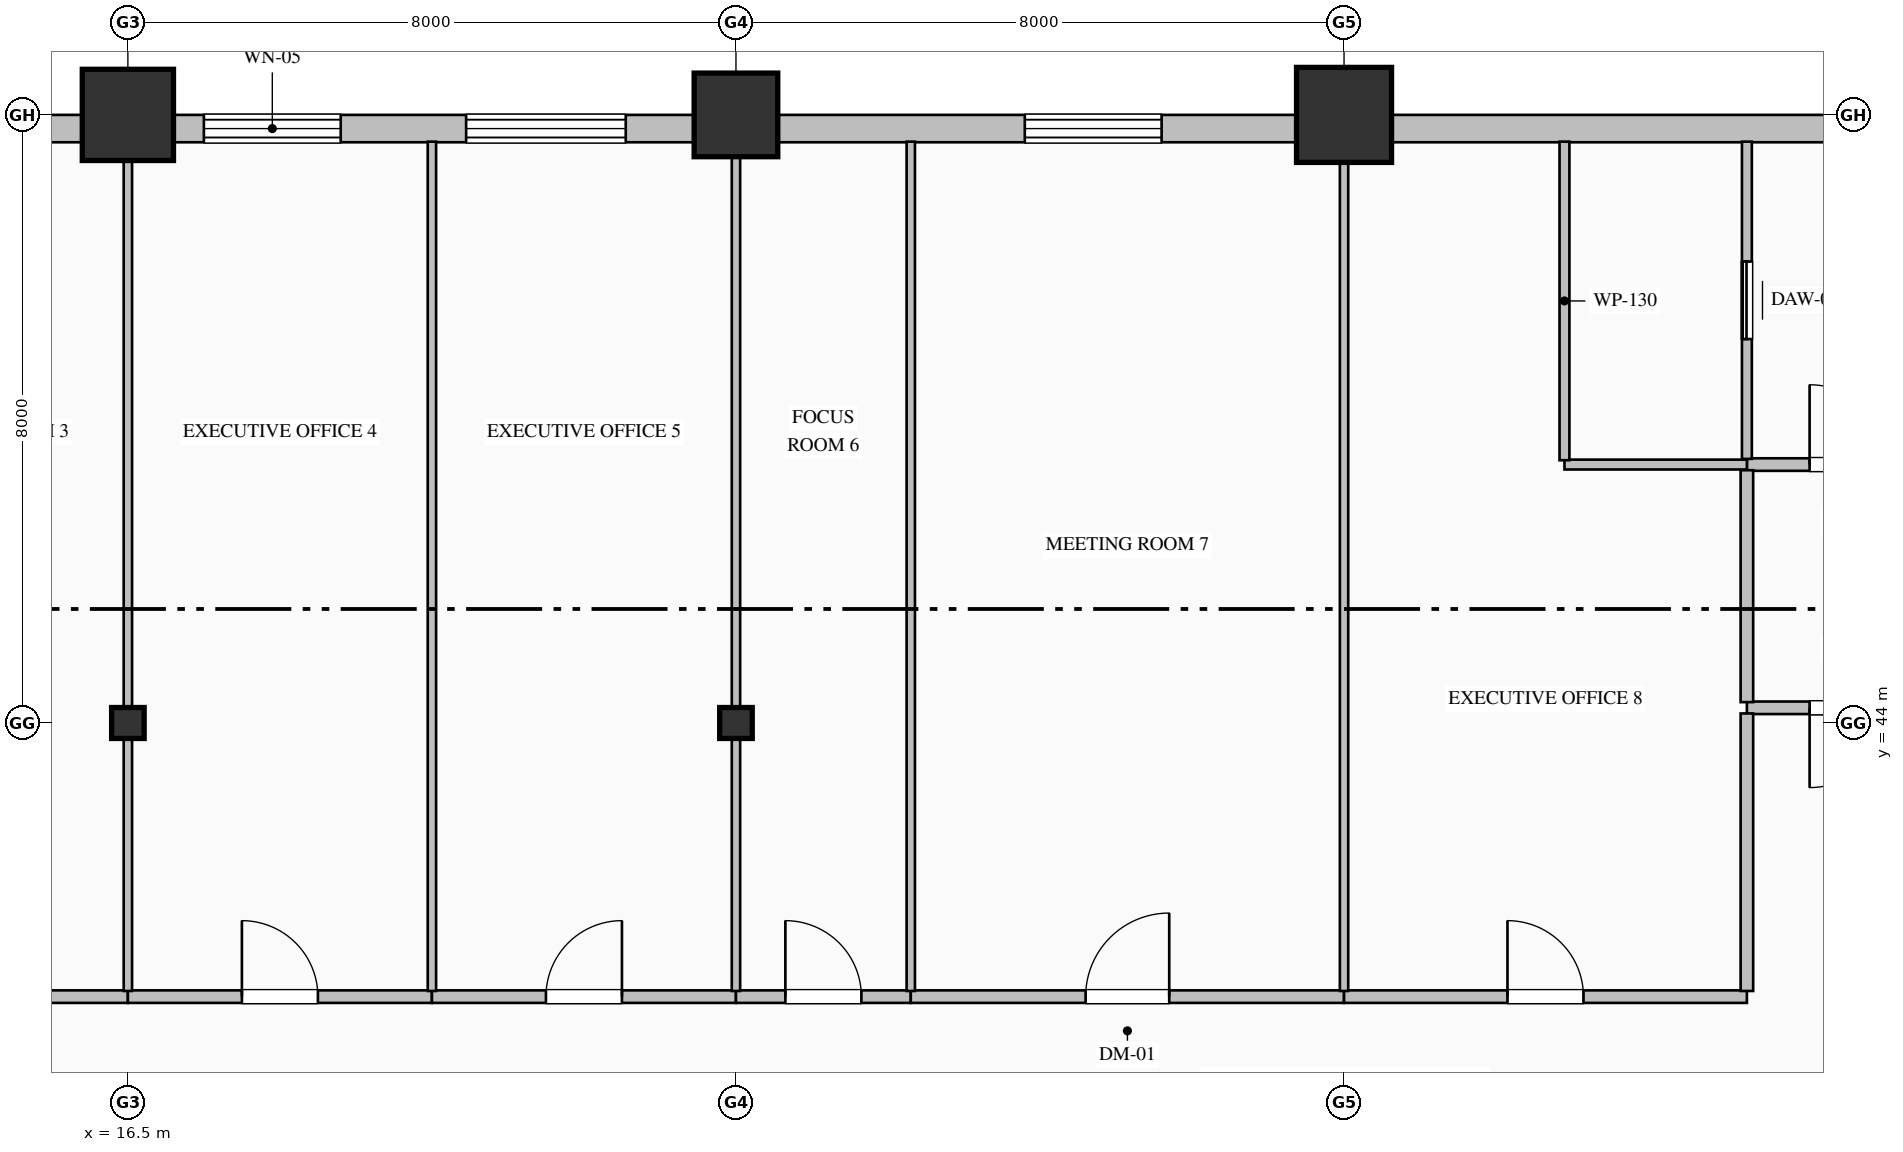
"""IFC4 building model, lengths in metres.
Left out: names, types, materials, properties, quantities, classifications, styles, units other than length and angle.
Written with IfcOpenShell. Run it as: python <this file> out.ifc"""

import sys

from ifc_helpers import new_model, si_unit, direction, frame, frame_2d, origin, origin_2d, place, context, subcontext, project, spatial, rectangle, hollow_rectangle, hollow_circle, i_section, extrude, element, fill, save


model = new_model("IFC4")
c1 = context("Model", 3, precision=1e-05, world=origin(), true_north=direction((0.0, 1.0)))
c2 = subcontext(c1, "Body", "Model", "MODEL_VIEW")
j1 = project(units=[si_unit("LENGTHUNIT", "METRE"), si_unit("PLANEANGLEUNIT", "RADIAN")], contexts=[c1])
p1 = place(None, origin())
s1 = spatial("IfcSite", under=j1, at=p1, CompositionType="ELEMENT")
p2 = place(p1, origin())
s2 = spatial("IfcBuilding", under=s1, at=p2, CompositionType="ELEMENT")
p3 = place(p2, frame((0.0, 0.0, 32.2)))
s3 = spatial("IfcBuildingStorey", under=s2, at=p3, CompositionType="ELEMENT", Elevation=32.2)
p4 = place(p3, frame((16.5, 44.0, 0.0), z_axis=(0.0, 0.0, 1.0), x_axis=(1.0, 0.0, 0.0)))
e1 = element("IfcColumn", 1, at=p4, inside=s3, PredefinedType="COLUMN", context=c2, shape_type="SweptSolid", body=[
    extrude(i_section(OverallWidth=0.407, OverallDepth=0.428, WebThickness=0.02, FlangeThickness=0.035, FilletRadius=0.022, at=origin_2d()), origin(), (0.0, 0.0, 1.0), 4.0),
])
p5 = place(p3, frame((16.5, 52.0, 0.0), z_axis=(0.0, 0.0, 1.0), x_axis=(1.0, 0.0, 0.0)))
e2 = element("IfcColumn", 2, at=p5, inside=s3, PredefinedType="COLUMN", context=c2, shape_type="SweptSolid", body=[
    extrude(hollow_circle(Radius=0.6, WallThickness=0.04, at=origin_2d()), origin(), (0.0, 0.0, 1.0), 4.0),
])
p6 = place(p3, frame((24.5, 44.0, 0.0), z_axis=(0.0, 0.0, 1.0), x_axis=(1.0, 0.0, 0.0)))
e3 = element("IfcColumn", 3, at=p6, inside=s3, PredefinedType="COLUMN", context=c2, shape_type="SweptSolid", body=[
    extrude(i_section(OverallWidth=0.407, OverallDepth=0.428, WebThickness=0.02, FlangeThickness=0.035, FilletRadius=0.022, at=origin_2d()), origin(), (0.0, 0.0, 1.0), 4.0),
])
p7 = place(p3, frame((24.5, 52.0, 0.0), z_axis=(0.0, 0.0, 1.0), x_axis=(1.0, 0.0, 0.0)))
e4 = element("IfcColumn", 4, at=p7, inside=s3, PredefinedType="COLUMN", context=c2, shape_type="SweptSolid", body=[
    extrude(hollow_rectangle(XDim=1.1, YDim=1.1, WallThickness=0.04, at=origin_2d()), origin(), (0.0, 0.0, 1.0), 4.0),
])
p8 = place(p3, frame((32.5, 52.0, 0.0), z_axis=(0.0, 0.0, 1.0), x_axis=(1.0, 0.0, 0.0)))
e5 = element("IfcColumn", 5, at=p8, inside=s3, PredefinedType="COLUMN", context=c2, shape_type="SweptSolid", body=[
    extrude(hollow_rectangle(XDim=1.25, YDim=1.25, WallThickness=0.045, at=origin_2d()), origin(), (0.0, 0.0, 1.0), 4.0),
])
p9 = place(p3, frame((4.0, 51.82, 0.0), z_axis=(0.0, 0.0, 1.0), x_axis=(1.0, 0.0, 0.0)))
e6 = element("IfcWall", 6, at=p9, inside=s3, PredefinedType="SOLIDWALL", context=c2, shape_type="SweptSolid", body=[
    extrude(rectangle(XDim=36.52, YDim=0.36, at=frame_2d((18.26, 0.0))), origin(), (0.0, 0.0, 1.0), 3.25),
])
p10 = place(p9, frame((6.15, 0.0, 0.85)))
e7 = element("IfcOpeningElement", 7, at=p10, cuts=e6, PredefinedType="OPENING", context=c2, shape_type="SweptSolid", body=[
    extrude(rectangle(XDim=2.1, YDim=2.05, at=frame_2d((1.05, 1.025))), frame((0.0, 0.19, 0.0), z_axis=(0.0, -1.0, 0.0), x_axis=(1.0, 0.0, 0.0)), (0.0, 0.0, 1.0), 0.38),
])
p11 = place(p9, frame((13.5, 0.0, 0.85)))
e8 = element("IfcOpeningElement", 8, at=p11, cuts=e6, PredefinedType="OPENING", context=c2, shape_type="SweptSolid", body=[
    extrude(rectangle(XDim=1.8, YDim=2.05, at=frame_2d((0.9, 1.025))), frame((0.0, 0.19, 0.0), z_axis=(0.0, -1.0, 0.0), x_axis=(1.0, 0.0, 0.0)), (0.0, 0.0, 1.0), 0.38),
])
p12 = place(p9, frame((16.95, 0.0, 0.85)))
e9 = element("IfcOpeningElement", 9, at=p12, cuts=e6, PredefinedType="OPENING", context=c2, shape_type="SweptSolid", body=[
    extrude(rectangle(XDim=2.1, YDim=2.05, at=frame_2d((1.05, 1.025))), frame((0.0, 0.19, 0.0), z_axis=(0.0, -1.0, 0.0), x_axis=(1.0, 0.0, 0.0)), (0.0, 0.0, 1.0), 0.38),
])
p13 = place(p9, frame((24.3, 0.0, 0.85)))
e10 = element("IfcOpeningElement", 10, at=p13, cuts=e6, PredefinedType="OPENING", context=c2, shape_type="SweptSolid", body=[
    extrude(rectangle(XDim=1.8, YDim=2.05, at=frame_2d((0.9, 1.025))), frame((0.0, 0.19, 0.0), z_axis=(0.0, -1.0, 0.0), x_axis=(1.0, 0.0, 0.0)), (0.0, 0.0, 1.0), 0.38),
])
p14 = place(p3, frame((37.8, 47.4, 0.0), z_axis=(0.0, 0.0, 1.0), x_axis=(1.0, 0.0, 0.0)))
e11 = element("IfcWall", 11, at=p14, inside=s3, PredefinedType="PARTITIONING", context=c2, shape_type="SweptSolid", body=[
    extrude(rectangle(XDim=2.7, YDim=0.165, at=frame_2d((1.35, 0.0))), origin(), (0.0, 0.0, 1.0), 3.75),
])
p15 = place(p14, frame((0.825, 0.0, 0.0)))
e12 = element("IfcOpeningElement", 12, at=p15, cuts=e11, PredefinedType="OPENING", context=c2, shape_type="SweptSolid", body=[
    extrude(rectangle(XDim=1.05, YDim=2.15, at=frame_2d((0.525, 1.075))), frame((0.0, 0.093, 0.0), z_axis=(0.0, -1.0, 0.0), x_axis=(1.0, 0.0, 0.0)), (0.0, 0.0, 1.0), 0.185),
])
p16 = place(p3, frame((40.5, 44.2, 0.0), z_axis=(0.0, 0.0, 1.0), x_axis=(-1.0, 0.0, 0.0)))
e13 = element("IfcWall", 13, at=p16, inside=s3, PredefinedType="PARTITIONING", context=c2, shape_type="SweptSolid", body=[
    extrude(rectangle(XDim=2.7, YDim=0.165, at=frame_2d((1.35, 0.0))), origin(), (0.0, 0.0, 1.0), 3.75),
])
p17 = place(p16, frame((0.825, 0.0, 0.0)))
e14 = element("IfcOpeningElement", 14, at=p17, cuts=e13, PredefinedType="OPENING", context=c2, shape_type="SweptSolid", body=[
    extrude(rectangle(XDim=1.05, YDim=2.15, at=frame_2d((0.525, 1.075))), frame((0.0, 0.093, 0.0), z_axis=(0.0, -1.0, 0.0), x_axis=(1.0, 0.0, 0.0)), (0.0, 0.0, 1.0), 0.185),
])
p18 = place(p3, frame((37.8, 44.274, 0.0), z_axis=(0.0, 0.0, 1.0), x_axis=(0.0, 1.0, 0.0)))
e15 = element("IfcWall", 15, at=p18, inside=s3, PredefinedType="PARTITIONING", context=c2, shape_type="SweptSolid", body=[
    extrude(rectangle(XDim=3.051, YDim=0.165, at=frame_2d((1.525, 0.0))), origin(), (0.0, 0.0, 1.0), 3.75),
])
p19 = place(p3, frame((37.8, 47.475, 0.0), z_axis=(0.0, 0.0, 1.0), x_axis=(0.0, 1.0, 0.0)))
e16 = element("IfcWall", 16, at=p19, inside=s3, PredefinedType="PARTITIONING", context=c2, shape_type="SweptSolid", body=[
    extrude(rectangle(XDim=4.173, YDim=0.13, at=frame_2d((2.087, 0.0))), origin(), (0.0, 0.0, 1.0), 3.75),
])
p20 = place(p19, frame((1.577, 0.0, 0.0)))
e17 = element("IfcOpeningElement", 17, at=p20, cuts=e16, PredefinedType="OPENING", context=c2, shape_type="SweptSolid", body=[
    extrude(rectangle(XDim=1.02, YDim=2.15, at=frame_2d((0.51, 1.075))), frame((0.0, 0.075, 0.0), z_axis=(0.0, -1.0, 0.0), x_axis=(1.0, 0.0, 0.0)), (0.0, 0.0, 1.0), 0.15),
])
p21 = place(p3, frame((37.8, 47.4, 0.0), z_axis=(0.0, 0.0, 1.0), x_axis=(-1.0, 0.0, 0.0)))
e18 = element("IfcWall", 18, at=p21, inside=s3, PredefinedType="PARTITIONING", context=c2, shape_type="SweptSolid", body=[
    extrude(rectangle(XDim=2.4, YDim=0.13, at=frame_2d((1.2, 0.0))), origin(), (0.0, 0.0, 1.0), 3.75),
])
p22 = place(p3, frame((35.4, 47.457, 0.0), z_axis=(0.0, 0.0, 1.0), x_axis=(0.0, 1.0, 0.0)))
e19 = element("IfcWall", 19, at=p22, inside=s3, PredefinedType="PARTITIONING", context=c2, shape_type="SweptSolid", body=[
    extrude(rectangle(XDim=4.191, YDim=0.13, at=frame_2d((2.095, 0.0))), origin(), (0.0, 0.0, 1.0), 3.75),
])
p23 = place(p3, frame((12.8, 40.4, 0.0), z_axis=(0.0, 0.0, 1.0), x_axis=(1.0, 0.0, 0.0)))
e20 = element("IfcWall", 20, at=p23, inside=s3, PredefinedType="PARTITIONING", context=c2, shape_type="SweptSolid", body=[
    extrude(rectangle(XDim=3.7, YDim=0.165, at=frame_2d((1.85, 0.0))), origin(), (0.0, 0.0, 1.0), 3.75),
])
p24 = place(p23, frame((1.3, 0.0, 0.0)))
e21 = element("IfcOpeningElement", 21, at=p24, cuts=e20, PredefinedType="OPENING", context=c2, shape_type="SweptSolid", body=[
    extrude(rectangle(XDim=1.1, YDim=2.2, at=frame_2d((0.55, 1.1))), frame((0.0, 0.093, 0.0), z_axis=(0.0, -1.0, 0.0), x_axis=(1.0, 0.0, 0.0)), (0.0, 0.0, 1.0), 0.185),
])
p25 = place(p3, frame((16.5, 40.4, 0.0), z_axis=(0.0, 0.0, 1.0), x_axis=(1.0, 0.0, 0.0)))
e22 = element("IfcWall", 22, at=p25, inside=s3, PredefinedType="PARTITIONING", context=c2, shape_type="SweptSolid", body=[
    extrude(rectangle(XDim=4.0, YDim=0.165, at=frame_2d((2.0, 0.0))), origin(), (0.0, 0.0, 1.0), 3.75),
])
p26 = place(p25, frame((1.5, 0.0, 0.0)))
e23 = element("IfcOpeningElement", 23, at=p26, cuts=e22, PredefinedType="OPENING", context=c2, shape_type="SweptSolid", body=[
    extrude(rectangle(XDim=1.0, YDim=2.15, at=frame_2d((0.5, 1.075))), frame((0.0, 0.093, 0.0), z_axis=(0.0, -1.0, 0.0), x_axis=(1.0, 0.0, 0.0)), (0.0, 0.0, 1.0), 0.185),
])
p27 = place(p3, frame((20.5, 40.4, 0.0), z_axis=(0.0, 0.0, 1.0), x_axis=(1.0, 0.0, 0.0)))
e24 = element("IfcWall", 24, at=p27, inside=s3, PredefinedType="PARTITIONING", context=c2, shape_type="SweptSolid", body=[
    extrude(rectangle(XDim=4.0, YDim=0.165, at=frame_2d((2.0, 0.0))), origin(), (0.0, 0.0, 1.0), 3.75),
])
p28 = place(p27, frame((1.5, 0.0, 0.0)))
e25 = element("IfcOpeningElement", 25, at=p28, cuts=e24, PredefinedType="OPENING", context=c2, shape_type="SweptSolid", body=[
    extrude(rectangle(XDim=1.0, YDim=2.15, at=frame_2d((0.5, 1.075))), frame((0.0, 0.093, 0.0), z_axis=(0.0, -1.0, 0.0), x_axis=(1.0, 0.0, 0.0)), (0.0, 0.0, 1.0), 0.185),
])
p29 = place(p3, frame((24.5, 40.4, 0.0), z_axis=(0.0, 0.0, 1.0), x_axis=(1.0, 0.0, 0.0)))
e26 = element("IfcWall", 26, at=p29, inside=s3, PredefinedType="PARTITIONING", context=c2, shape_type="SweptSolid", body=[
    extrude(rectangle(XDim=2.3, YDim=0.165, at=frame_2d((1.15, 0.0))), origin(), (0.0, 0.0, 1.0), 3.75),
])
p30 = place(p29, frame((0.65, 0.0, 0.0)))
e27 = element("IfcOpeningElement", 27, at=p30, cuts=e26, PredefinedType="OPENING", context=c2, shape_type="SweptSolid", body=[
    extrude(rectangle(XDim=1.0, YDim=2.15, at=frame_2d((0.5, 1.075))), frame((0.0, 0.093, 0.0), z_axis=(0.0, -1.0, 0.0), x_axis=(1.0, 0.0, 0.0)), (0.0, 0.0, 1.0), 0.185),
])
p31 = place(p3, frame((26.8, 40.4, 0.0), z_axis=(0.0, 0.0, 1.0), x_axis=(1.0, 0.0, 0.0)))
e28 = element("IfcWall", 28, at=p31, inside=s3, PredefinedType="PARTITIONING", context=c2, shape_type="SweptSolid", body=[
    extrude(rectangle(XDim=5.7, YDim=0.165, at=frame_2d((2.85, 0.0))), origin(), (0.0, 0.0, 1.0), 3.75),
])
p32 = place(p31, frame((2.3, 0.0, 0.0)))
e29 = element("IfcOpeningElement", 29, at=p32, cuts=e28, PredefinedType="OPENING", context=c2, shape_type="SweptSolid", body=[
    extrude(rectangle(XDim=1.1, YDim=2.2, at=frame_2d((0.55, 1.1))), frame((0.0, 0.093, 0.0), z_axis=(0.0, -1.0, 0.0), x_axis=(1.0, 0.0, 0.0)), (0.0, 0.0, 1.0), 0.185),
])
p33 = place(p3, frame((32.5, 40.4, 0.0), z_axis=(0.0, 0.0, 1.0), x_axis=(1.0, 0.0, 0.0)))
e30 = element("IfcWall", 30, at=p33, inside=s3, PredefinedType="PARTITIONING", context=c2, shape_type="SweptSolid", body=[
    extrude(rectangle(XDim=5.3, YDim=0.165, at=frame_2d((2.65, 0.0))), origin(), (0.0, 0.0, 1.0), 3.75),
])
p34 = place(p33, frame((2.15, 0.0, 0.0)))
e31 = element("IfcOpeningElement", 31, at=p34, cuts=e30, PredefinedType="OPENING", context=c2, shape_type="SweptSolid", body=[
    extrude(rectangle(XDim=1.0, YDim=2.15, at=frame_2d((0.5, 1.075))), frame((0.0, 0.093, 0.0), z_axis=(0.0, -1.0, 0.0), x_axis=(1.0, 0.0, 0.0)), (0.0, 0.0, 1.0), 0.185),
])
p35 = place(p3, frame((37.8, 40.475, 0.0), z_axis=(0.0, 0.0, 1.0), x_axis=(0.0, 1.0, 0.0)))
e32 = element("IfcWall", 32, at=p35, inside=s3, PredefinedType="PARTITIONING", context=c2, shape_type="SweptSolid", body=[
    extrude(rectangle(XDim=3.651, YDim=0.165, at=frame_2d((1.825, 0.0))), origin(), (0.0, 0.0, 1.0), 3.75),
])
p36 = place(p3, frame((16.5, 51.648, 0.0), z_axis=(0.0, 0.0, 1.0), x_axis=(0.0, -1.0, 0.0)))
e33 = element("IfcWall", 33, at=p36, inside=s3, PredefinedType="MOVABLE", context=c2, shape_type="SweptSolid", body=[
    extrude(rectangle(XDim=11.173, YDim=0.11, at=frame_2d((5.587, 0.0))), origin(), (0.0, 0.0, 1.0), 3.042),
])
p37 = place(p3, frame((20.5, 51.648, 0.0), z_axis=(0.0, 0.0, 1.0), x_axis=(0.0, -1.0, 0.0)))
e34 = element("IfcWall", 34, at=p37, inside=s3, PredefinedType="MOVABLE", context=c2, shape_type="SweptSolid", body=[
    extrude(rectangle(XDim=11.173, YDim=0.11, at=frame_2d((5.587, 0.0))), origin(), (0.0, 0.0, 1.0), 3.75),
])
p38 = place(p3, frame((24.5, 51.648, 0.0), z_axis=(0.0, 0.0, 1.0), x_axis=(0.0, -1.0, 0.0)))
e35 = element("IfcWall", 35, at=p38, inside=s3, PredefinedType="MOVABLE", context=c2, shape_type="SweptSolid", body=[
    extrude(rectangle(XDim=11.173, YDim=0.11, at=frame_2d((5.587, 0.0))), origin(), (0.0, 0.0, 1.0), 3.042),
])
for number, where, z_axis, x_axis in (
    (36, (26.8, 51.648, 0.0), (0.0, 0.0, 1.0), (0.0, -1.0, 0.0)),
    (37, (32.5, 51.648, 0.0), (0.0, 0.0, 1.0), (0.0, -1.0, 0.0)),
):
    element("IfcWall", number, at=place(p3, frame(where, z_axis=z_axis, x_axis=x_axis)), inside=s3, PredefinedType="MOVABLE", context=c2, shape_type="SweptSolid", body=[
        extrude(rectangle(XDim=11.173, YDim=0.11, at=frame_2d((5.587, 0.0))), origin(), (0.0, 0.0, 1.0), 3.75),
    ])
p39 = place(p11, origin())
e38 = element("IfcWindow", 38, at=p39, inside=s3, PartitioningType="TRIPLE_PANEL_VERTICAL", PredefinedType="WINDOW", context=c2, shape_type="SweptSolid", body=[
    extrude(rectangle(XDim=1.8, YDim=2.05, at=frame_2d((0.9, 1.025))), frame((0.0, 0.15, 0.0), z_axis=(0.0, -1.0, 0.0), x_axis=(1.0, 0.0, 0.0)), (0.0, 0.0, 1.0), 0.06),
])
fill(e8, e38)
p40 = place(p12, origin())
e39 = element("IfcWindow", 39, at=p40, inside=s3, PartitioningType="TRIPLE_PANEL_VERTICAL", PredefinedType="WINDOW", context=c2, shape_type="SweptSolid", body=[
    extrude(rectangle(XDim=2.1, YDim=2.05, at=frame_2d((1.05, 1.025))), frame((0.0, 0.15, 0.0), z_axis=(0.0, -1.0, 0.0), x_axis=(1.0, 0.0, 0.0)), (0.0, 0.0, 1.0), 0.06),
])
fill(e9, e39)
p41 = place(p13, origin())
e40 = element("IfcWindow", 40, at=p41, inside=s3, PartitioningType="TRIPLE_PANEL_VERTICAL", PredefinedType="WINDOW", context=c2, shape_type="SweptSolid", body=[
    extrude(rectangle(XDim=1.8, YDim=2.05, at=frame_2d((0.9, 1.025))), frame((0.0, 0.15, 0.0), z_axis=(0.0, -1.0, 0.0), x_axis=(1.0, 0.0, 0.0)), (0.0, 0.0, 1.0), 0.06),
])
fill(e10, e40)
p42 = place(p15, origin())
e41 = element("IfcDoor", 41, at=p42, inside=s3, OperationType="SINGLE_SWING_LEFT", PredefinedType="DOOR", context=c2, shape_type="SweptSolid", body=[
    extrude(rectangle(XDim=1.05, YDim=2.15, at=frame_2d((0.525, 1.075))), frame((0.0, 0.025, 0.0), z_axis=(0.0, -1.0, 0.0), x_axis=(1.0, 0.0, 0.0)), (0.0, 0.0, 1.0), 0.05),
])
fill(e12, e41)
p43 = place(p17, origin())
e42 = element("IfcDoor", 42, at=p43, inside=s3, OperationType="SINGLE_SWING_RIGHT", PredefinedType="DOOR", context=c2, shape_type="SweptSolid", body=[
    extrude(rectangle(XDim=1.05, YDim=2.15, at=frame_2d((0.525, 1.075))), frame((0.0, 0.025, 0.0), z_axis=(0.0, -1.0, 0.0), x_axis=(1.0, 0.0, 0.0)), (0.0, 0.0, 1.0), 0.05),
])
fill(e14, e42)
p44 = place(p20, origin())
e43 = element("IfcDoor", 43, at=p44, inside=s3, OperationType="SLIDING_TO_LEFT", PredefinedType="DOOR", context=c2, shape_type="SweptSolid", body=[
    extrude(rectangle(XDim=1.02, YDim=2.15, at=frame_2d((0.51, 1.075))), frame((0.0, 0.025, 0.0), z_axis=(0.0, -1.0, 0.0), x_axis=(1.0, 0.0, 0.0)), (0.0, 0.0, 1.0), 0.05),
])
fill(e17, e43)
p45 = place(p26, origin())
e44 = element("IfcDoor", 44, at=p45, inside=s3, OperationType="SINGLE_SWING_LEFT", PredefinedType="DOOR", context=c2, shape_type="SweptSolid", body=[
    extrude(rectangle(XDim=1.0, YDim=2.15, at=frame_2d((0.5, 1.075))), frame((0.0, 0.025, 0.0), z_axis=(0.0, -1.0, 0.0), x_axis=(1.0, 0.0, 0.0)), (0.0, 0.0, 1.0), 0.05),
])
fill(e23, e44)
p46 = place(p28, origin())
e45 = element("IfcDoor", 45, at=p46, inside=s3, OperationType="SINGLE_SWING_RIGHT", PredefinedType="DOOR", context=c2, shape_type="SweptSolid", body=[
    extrude(rectangle(XDim=1.0, YDim=2.15, at=frame_2d((0.5, 1.075))), frame((0.0, 0.025, 0.0), z_axis=(0.0, -1.0, 0.0), x_axis=(1.0, 0.0, 0.0)), (0.0, 0.0, 1.0), 0.05),
])
fill(e25, e45)
p47 = place(p30, origin())
e46 = element("IfcDoor", 46, at=p47, inside=s3, OperationType="SINGLE_SWING_LEFT", PredefinedType="DOOR", context=c2, shape_type="SweptSolid", body=[
    extrude(rectangle(XDim=1.0, YDim=2.15, at=frame_2d((0.5, 1.075))), frame((0.0, 0.025, 0.0), z_axis=(0.0, -1.0, 0.0), x_axis=(1.0, 0.0, 0.0)), (0.0, 0.0, 1.0), 0.05),
])
fill(e27, e46)
p48 = place(p32, origin())
e47 = element("IfcDoor", 47, at=p48, inside=s3, OperationType="SINGLE_SWING_RIGHT", PredefinedType="DOOR", context=c2, shape_type="SweptSolid", body=[
    extrude(rectangle(XDim=1.1, YDim=2.2, at=frame_2d((0.55, 1.1))), frame((0.0, 0.025, 0.0), z_axis=(0.0, -1.0, 0.0), x_axis=(1.0, 0.0, 0.0)), (0.0, 0.0, 1.0), 0.05),
])
fill(e29, e47)
p49 = place(p34, origin())
e48 = element("IfcDoor", 48, at=p49, inside=s3, OperationType="SINGLE_SWING_LEFT", PredefinedType="DOOR", context=c2, shape_type="SweptSolid", body=[
    extrude(rectangle(XDim=1.0, YDim=2.15, at=frame_2d((0.5, 1.075))), frame((0.0, 0.025, 0.0), z_axis=(0.0, -1.0, 0.0), x_axis=(1.0, 0.0, 0.0)), (0.0, 0.0, 1.0), 0.05),
])
fill(e31, e48)
save(model, sys.argv[1])
